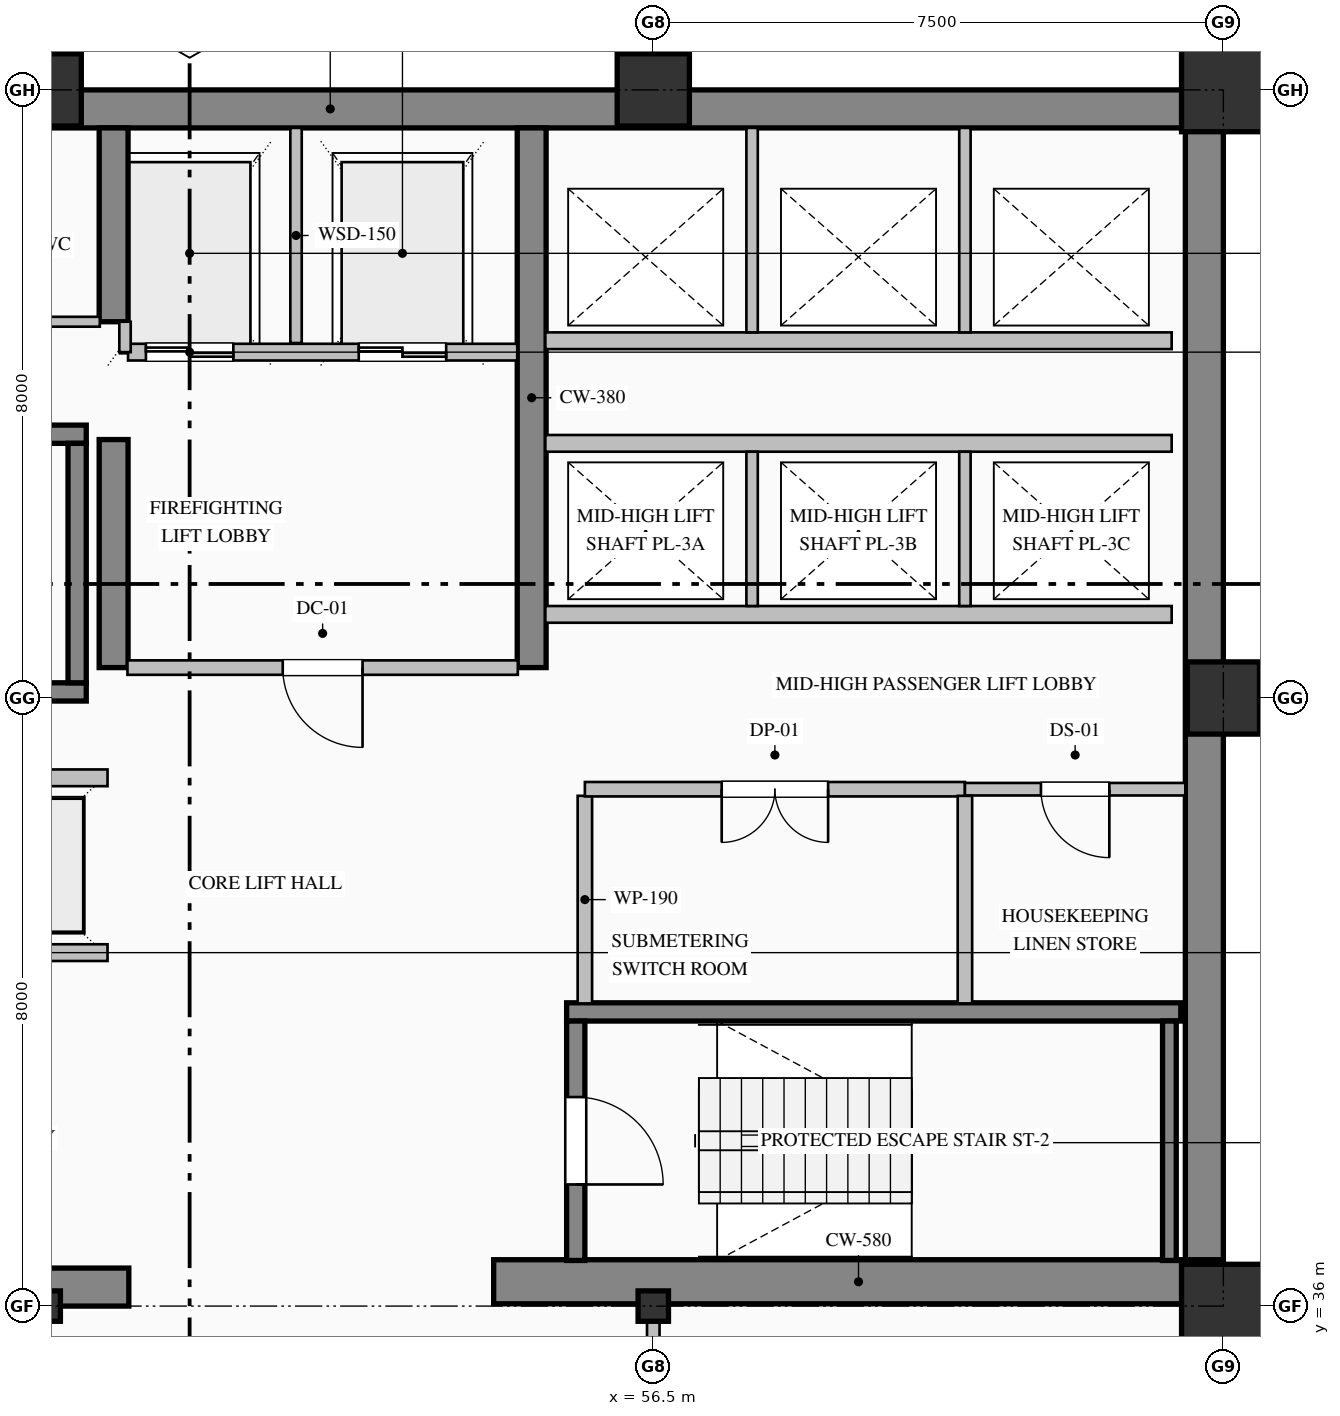
"""IFC4 building model, lengths in metres.
Left out: names, types, materials, properties, quantities, classifications, styles, units other than length and angle.
Written with IfcOpenShell. Run it as: python <this file> out.ifc"""

import sys

from ifc_helpers import new_model, si_unit, direction, frame, frame_2d, origin, origin_2d, place, context, subcontext, project, spatial, rectangle, hollow_rectangle, i_section, extrude, element, fill, save


model = new_model("IFC4")
c1 = context("Model", 3, precision=1e-05, world=origin(), true_north=direction((0.0, 1.0)))
c2 = subcontext(c1, "Body", "Model", "MODEL_VIEW")
j1 = project(units=[si_unit("LENGTHUNIT", "METRE"), si_unit("PLANEANGLEUNIT", "RADIAN")], contexts=[c1])
p1 = place(None, origin())
s1 = spatial("IfcSite", under=j1, at=p1, CompositionType="ELEMENT")
p2 = place(p1, origin())
s2 = spatial("IfcBuilding", under=s1, at=p2, CompositionType="ELEMENT")
p3 = place(p2, frame((0.0, 0.0, 147.0)))
s3 = spatial("IfcBuildingStorey", under=s2, at=p3, CompositionType="ELEMENT", Elevation=147.0)
p4 = place(p3, frame((40.5, 51.75, 0.0), z_axis=(0.0, 0.0, 1.0), x_axis=(1.0, 0.0, 0.0)))
e1 = element("IfcWall", 1, at=p4, inside=s3, PredefinedType="SHEAR", context=c2, shape_type="SweptSolid", body=[
    extrude(rectangle(XDim=23.5, YDim=0.5, at=frame_2d((11.75, 0.0))), origin(), (0.0, 0.0, 1.0), 3.765),
])
p5 = place(p3, frame((63.75, 36.32, 0.0), z_axis=(0.0, 0.0, 1.0), x_axis=(0.0, 1.0, 0.0)))
e2 = element("IfcWall", 2, at=p5, inside=s3, PredefinedType="SHEAR", context=c2, shape_type="SweptSolid", body=[
    extrude(rectangle(XDim=15.18, YDim=0.5, at=frame_2d((7.59, 0.0))), origin(), (0.0, 0.0, 1.0), 3.765),
])
p6 = place(p3, frame((40.5, 36.25, 0.0), z_axis=(0.0, 0.0, 1.0), x_axis=(1.0, 0.0, 0.0)))
e3 = element("IfcWall", 3, at=p6, inside=s3, PredefinedType="SHEAR", context=c2, shape_type="SweptSolid", body=[
    extrude(rectangle(XDim=9.1, YDim=0.5, at=frame_2d((4.55, 0.0))), origin(), (0.0, 0.0, 1.0), 3.765),
])
p7 = place(p3, frame((54.4, 36.32, 0.0), z_axis=(0.0, 0.0, 1.0), x_axis=(1.0, 0.0, 0.0)))
e4 = element("IfcWall", 4, at=p7, inside=s3, PredefinedType="SHEAR", context=c2, shape_type="SweptSolid", body=[
    extrude(rectangle(XDim=9.6, YDim=0.58, at=frame_2d((4.8, 0.0))), origin(), (0.0, 0.0, 1.0), 4.0),
])
p8 = place(p3, frame((49.4, 44.4, 0.0), z_axis=(0.0, 0.0, 1.0), x_axis=(0.0, 1.0, 0.0)))
e5 = element("IfcWall", 5, at=p8, inside=s3, PredefinedType="SHEAR", context=c2, shape_type="SweptSolid", body=[
    extrude(rectangle(XDim=3.0, YDim=0.38, at=frame_2d((1.5, 0.0))), origin(), (0.0, 0.0, 1.0), 3.765),
])
p9 = place(p3, frame((49.4, 48.95, 0.0), z_axis=(0.0, 0.0, 1.0), x_axis=(0.0, 1.0, 0.0)))
e6 = element("IfcWall", 6, at=p9, inside=s3, PredefinedType="SHEAR", context=c2, shape_type="SweptSolid", body=[
    extrude(rectangle(XDim=2.55, YDim=0.38, at=frame_2d((1.275, 0.0))), origin(), (0.0, 0.0, 1.0), 3.765),
])
p10 = place(p3, frame((54.9, 44.4, 0.0), z_axis=(0.0, 0.0, 1.0), x_axis=(0.0, 1.0, 0.0)))
e7 = element("IfcWall", 7, at=p10, inside=s3, PredefinedType="SHEAR", context=c2, shape_type="SweptSolid", body=[
    extrude(rectangle(XDim=7.1, YDim=0.38, at=frame_2d((3.55, 0.0))), origin(), (0.0, 0.0, 1.0), 3.765),
])
p11 = place(p3, frame((48.5, 36.0, 0.0), z_axis=(0.0, 0.0, 1.0), x_axis=(1.0, 0.0, 0.0)))
e8 = element("IfcColumn", 8, at=p11, inside=s3, PredefinedType="COLUMN", context=c2, shape_type="SweptSolid", body=[
    extrude(i_section(OverallWidth=0.4, OverallDepth=0.4, WebThickness=0.013, FlangeThickness=0.021, FilletRadius=0.022, at=origin_2d()), origin(), (0.0, 0.0, 1.0), 4.0),
])
p12 = place(p3, frame((48.5, 52.0, 0.0), z_axis=(0.0, 0.0, 1.0), x_axis=(1.0, 0.0, 0.0)))
e9 = element("IfcColumn", 9, at=p12, inside=s3, PredefinedType="COLUMN", context=c2, shape_type="SweptSolid", body=[
    extrude(hollow_rectangle(XDim=0.95, YDim=0.95, WallThickness=0.036, at=origin_2d()), origin(), (0.0, 0.0, 1.0), 4.0),
])
p13 = place(p3, frame((56.5, 36.0, 0.0), z_axis=(0.0, 0.0, 1.0), x_axis=(1.0, 0.0, 0.0)))
e10 = element("IfcColumn", 10, at=p13, inside=s3, PredefinedType="COLUMN", context=c2, shape_type="SweptSolid", body=[
    extrude(i_section(OverallWidth=0.4, OverallDepth=0.4, WebThickness=0.013, FlangeThickness=0.021, FilletRadius=0.022, at=origin_2d()), origin(), (0.0, 0.0, 1.0), 4.0),
])
p14 = place(p3, frame((56.5, 52.0, 0.0), z_axis=(0.0, 0.0, 1.0), x_axis=(1.0, 0.0, 0.0)))
e11 = element("IfcColumn", 11, at=p14, inside=s3, PredefinedType="COLUMN", context=c2, shape_type="SweptSolid", body=[
    extrude(hollow_rectangle(XDim=0.95, YDim=0.95, WallThickness=0.036, at=origin_2d()), origin(), (0.0, 0.0, 1.0), 4.0),
])
p15 = place(p3, frame((64.0, 36.0, 0.0), z_axis=(0.0, 0.0, 1.0), x_axis=(1.0, 0.0, 0.0)))
e12 = element("IfcColumn", 12, at=p15, inside=s3, PredefinedType="COLUMN", context=c2, shape_type="SweptSolid", body=[
    extrude(hollow_rectangle(XDim=1.1, YDim=1.1, WallThickness=0.04, at=origin_2d()), origin(), (0.0, 0.0, 1.0), 4.0),
])
p16 = place(p3, frame((64.0, 44.0, 0.0), z_axis=(0.0, 0.0, 1.0), x_axis=(1.0, 0.0, 0.0)))
e13 = element("IfcColumn", 13, at=p16, inside=s3, PredefinedType="COLUMN", context=c2, shape_type="SweptSolid", body=[
    extrude(hollow_rectangle(XDim=0.95, YDim=0.95, WallThickness=0.036, at=origin_2d()), origin(), (0.0, 0.0, 1.0), 4.0),
])
p17 = place(p3, frame((64.0, 52.0, 0.0), z_axis=(0.0, 0.0, 1.0), x_axis=(1.0, 0.0, 0.0)))
e14 = element("IfcColumn", 14, at=p17, inside=s3, PredefinedType="COLUMN", context=c2, shape_type="SweptSolid", body=[
    extrude(hollow_rectangle(XDim=1.1, YDim=1.1, WallThickness=0.04, at=origin_2d()), origin(), (0.0, 0.0, 1.0), 4.0),
])
p18 = place(p3, frame((63.83, 36.05, 0.0), z_axis=(0.0, 0.0, 1.0), x_axis=(0.0, -1.0, 0.0)))
e15 = element("IfcWall", 15, at=p18, inside=s3, PredefinedType="SOLIDWALL", context=c2, shape_type="SweptSolid", body=[
    extrude(rectangle(XDim=28.05, YDim=0.34, at=frame_2d((14.025, 0.0))), origin(), (0.0, 0.0, 1.0), 3.265),
])
p19 = place(p18, frame((3.0, 0.0, 0.7)))
e16 = element("IfcOpeningElement", 16, at=p19, cuts=e15, PredefinedType="OPENING", context=c2, shape_type="SweptSolid", body=[
    extrude(rectangle(XDim=1.2, YDim=1.85, at=frame_2d((0.6, 0.925))), frame((0.0, 0.18, 0.0), z_axis=(0.0, -1.0, 0.0), x_axis=(1.0, 0.0, 0.0)), (0.0, 0.0, 1.0), 0.36),
])
p20 = place(p18, frame((9.975, 0.0, 0.85)))
e17 = element("IfcOpeningElement", 17, at=p20, cuts=e15, PredefinedType="OPENING", context=c2, shape_type="SweptSolid", body=[
    extrude(rectangle(XDim=1.65, YDim=1.95, at=frame_2d((0.825, 0.975))), frame((0.0, 0.18, 0.0), z_axis=(0.0, -1.0, 0.0), x_axis=(1.0, 0.0, 0.0)), (0.0, 0.0, 1.0), 0.36),
])
p21 = place(p18, frame((24.6, 0.0, 0.7)))
e18 = element("IfcOpeningElement", 18, at=p21, cuts=e15, PredefinedType="OPENING", context=c2, shape_type="SweptSolid", body=[
    extrude(rectangle(XDim=1.2, YDim=1.85, at=frame_2d((0.6, 0.925))), frame((0.0, 0.18, 0.0), z_axis=(0.0, -1.0, 0.0), x_axis=(1.0, 0.0, 0.0)), (0.0, 0.0, 1.0), 0.36),
])
for number, where, z_axis, x_axis in (
    (19, (40.96, 47.47, 0.0), (0.0, 0.0, 1.0), (1.0, 0.0, 0.0)),
    (20, (49.04, 44.08, 0.0), (0.0, 0.0, 1.0), (-1.0, 0.0, 0.0)),
):
    element("IfcWall", number, at=place(p3, frame(where, z_axis=z_axis, x_axis=x_axis)), inside=s3, PredefinedType="SOLIDWALL", context=c2, shape_type="SweptSolid", body=[
        extrude(rectangle(XDim=8.08, YDim=0.24, at=frame_2d((4.04, 0.0))), origin(), (0.0, 0.0, 1.0), 4.0),
    ])
p22 = place(p3, frame((48.92, 44.2, 0.0), z_axis=(0.0, 0.0, 1.0), x_axis=(0.0, 1.0, 0.0)))
e21 = element("IfcWall", 21, at=p22, inside=s3, PredefinedType="SOLIDWALL", context=c2, shape_type="SweptSolid", body=[
    extrude(rectangle(XDim=3.15, YDim=0.24, at=frame_2d((1.575, 0.0))), origin(), (0.0, 0.0, 1.0), 4.0),
])
p23 = place(p3, frame((55.36, 39.87, 0.0), z_axis=(0.0, 0.0, 1.0), x_axis=(1.0, 0.0, 0.0)))
e22 = element("IfcWall", 22, at=p23, inside=s3, PredefinedType="SOLIDWALL", context=c2, shape_type="SweptSolid", body=[
    extrude(rectangle(XDim=8.08, YDim=0.24, at=frame_2d((4.04, 0.0))), origin(), (0.0, 0.0, 1.0), 4.0),
])
p24 = place(p3, frame((55.48, 39.75, 0.0), z_axis=(0.0, 0.0, 1.0), x_axis=(0.0, -1.0, 0.0)))
e23 = element("IfcWall", 23, at=p24, inside=s3, PredefinedType="SOLIDWALL", context=c2, shape_type="SweptSolid", body=[
    extrude(rectangle(XDim=3.15, YDim=0.24, at=frame_2d((1.575, 0.0))), origin(), (0.0, 0.0, 1.0), 4.0),
])
p25 = place(p24, frame((1.0, 0.0, 0.0)))
e24 = element("IfcOpeningElement", 24, at=p25, cuts=e23, PredefinedType="OPENING", context=c2, shape_type="SweptSolid", body=[
    extrude(rectangle(XDim=1.15, YDim=2.2, at=frame_2d((0.575, 1.1))), frame((0.0, 0.13, 0.0), z_axis=(0.0, -1.0, 0.0), x_axis=(1.0, 0.0, 0.0)), (0.0, 0.0, 1.0), 0.26),
])
p26 = place(p3, frame((63.29, 36.6, 0.0), z_axis=(0.0, 0.0, 1.0), x_axis=(0.0, 1.0, 0.0)))
e25 = element("IfcWall", 25, at=p26, inside=s3, PredefinedType="SOLIDWALL", context=c2, shape_type="SweptSolid", body=[
    extrude(rectangle(XDim=3.15, YDim=0.18, at=frame_2d((1.575, 0.0))), origin(), (0.0, 0.0, 1.0), 4.0),
])
p27 = place(p3, frame((54.71, 48.55, 0.0), z_axis=(0.0, 0.0, 1.0), x_axis=(-1.0, 0.0, 0.0)))
e26 = element("IfcWall", 26, at=p27, inside=s3, PredefinedType="PARTITIONING", context=c2, shape_type="SweptSolid", body=[
    extrude(rectangle(XDim=5.12, YDim=0.22, at=frame_2d((2.56, 0.0))), origin(), (0.0, 0.0, 1.0), 3.765),
])
p28 = place(p27, frame((3.735, 0.0, 0.0)))
e27 = element("IfcOpeningElement", 27, at=p28, cuts=e26, PredefinedType="OPENING", context=c2, shape_type="SweptSolid", body=[
    extrude(rectangle(XDim=1.15, YDim=2.2, at=frame_2d((0.575, 1.1))), frame((0.0, 0.12, 0.0), z_axis=(0.0, -1.0, 0.0), x_axis=(1.0, 0.0, 0.0)), (0.0, 0.0, 1.0), 0.24),
])
p29 = place(p27, frame((0.935, 0.0, 0.0)))
e28 = element("IfcOpeningElement", 28, at=p29, cuts=e26, PredefinedType="OPENING", context=c2, shape_type="SweptSolid", body=[
    extrude(rectangle(XDim=1.15, YDim=2.2, at=frame_2d((0.575, 1.1))), frame((0.0, 0.12, 0.0), z_axis=(0.0, -1.0, 0.0), x_axis=(1.0, 0.0, 0.0)), (0.0, 0.0, 1.0), 0.24),
])
p30 = place(p3, frame((51.8, 48.67, 0.0), z_axis=(0.0, 0.0, 1.0), x_axis=(0.0, 1.0, 0.0)))
e29 = element("IfcWall", 29, at=p30, inside=s3, PredefinedType="PARTITIONING", context=c2, shape_type="SweptSolid", body=[
    extrude(rectangle(XDim=2.83, YDim=0.15, at=frame_2d((1.415, 0.0))), origin(), (0.0, 0.0, 1.0), 3.765),
])
p31 = place(p3, frame((49.55, 48.55, 0.0), z_axis=(0.0, 0.0, 1.0), x_axis=(0.0, 1.0, 0.0)))
e30 = element("IfcWall", 30, at=p31, inside=s3, PredefinedType="PARTITIONING", context=c2, shape_type="SweptSolid", body=[
    extrude(rectangle(XDim=0.4, YDim=0.15, at=frame_2d((0.2, 0.0))), origin(), (0.0, 0.0, 1.0), 3.765),
])
p32 = place(p3, frame((49.32, 40.65, 0.0), z_axis=(0.0, 0.0, 1.0), x_axis=(-1.0, 0.0, 0.0)))
e31 = element("IfcWall", 31, at=p32, inside=s3, PredefinedType="PARTITIONING", context=c2, shape_type="SweptSolid", body=[
    extrude(rectangle(XDim=8.24, YDim=0.22, at=frame_2d((4.12, 0.0))), origin(), (0.0, 0.0, 1.0), 3.765),
])
p33 = place(p32, frame((6.37, 0.0, 0.0)))
e32 = element("IfcOpeningElement", 32, at=p33, cuts=e31, PredefinedType="OPENING", context=c2, shape_type="SweptSolid", body=[
    extrude(rectangle(XDim=1.1, YDim=2.2, at=frame_2d((0.55, 1.1))), frame((0.0, 0.12, 0.0), z_axis=(0.0, -1.0, 0.0), x_axis=(1.0, 0.0, 0.0)), (0.0, 0.0, 1.0), 0.24),
])
p34 = place(p32, frame((3.57, 0.0, 0.0)))
e33 = element("IfcOpeningElement", 33, at=p34, cuts=e31, PredefinedType="OPENING", context=c2, shape_type="SweptSolid", body=[
    extrude(rectangle(XDim=1.1, YDim=2.2, at=frame_2d((0.55, 1.1))), frame((0.0, 0.12, 0.0), z_axis=(0.0, -1.0, 0.0), x_axis=(1.0, 0.0, 0.0)), (0.0, 0.0, 1.0), 0.24),
])
p35 = place(p32, frame((0.77, 0.0, 0.0)))
e34 = element("IfcOpeningElement", 34, at=p35, cuts=e31, PredefinedType="OPENING", context=c2, shape_type="SweptSolid", body=[
    extrude(rectangle(XDim=1.1, YDim=2.2, at=frame_2d((0.55, 1.1))), frame((0.0, 0.12, 0.0), z_axis=(0.0, -1.0, 0.0), x_axis=(1.0, 0.0, 0.0)), (0.0, 0.0, 1.0), 0.24),
])
for number, where, z_axis, x_axis in (
    (35, (41.08, 42.95, 0.0), (0.0, 0.0, 1.0), (1.0, 0.0, 0.0)),
    (36, (63.32, 45.1, 0.0), (0.0, 0.0, 1.0), (-1.0, 0.0, 0.0)),
    (37, (55.08, 47.35, 0.0), (0.0, 0.0, 1.0), (1.0, 0.0, 0.0)),
):
    element("IfcWall", number, at=place(p3, frame(where, z_axis=z_axis, x_axis=x_axis)), inside=s3, PredefinedType="PARTITIONING", context=c2, shape_type="SweptSolid", body=[
        extrude(rectangle(XDim=8.24, YDim=0.22, at=frame_2d((4.12, 0.0))), origin(), (0.0, 0.0, 1.0), 3.765),
    ])
for number, where, z_axis, x_axis in (
    (38, (57.8, 45.21, 0.0), (0.0, 0.0, 1.0), (0.0, 1.0, 0.0)),
    (39, (60.6, 45.21, 0.0), (0.0, 0.0, 1.0), (0.0, 1.0, 0.0)),
):
    element("IfcWall", number, at=place(p3, frame(where, z_axis=z_axis, x_axis=x_axis)), inside=s3, PredefinedType="PARTITIONING", context=c2, shape_type="SweptSolid", body=[
        extrude(rectangle(XDim=2.03, YDim=0.15, at=frame_2d((1.015, 0.0))), origin(), (0.0, 0.0, 1.0), 3.765),
    ])
p36 = place(p3, frame((63.32, 48.7, 0.0), z_axis=(0.0, 0.0, 1.0), x_axis=(-1.0, 0.0, 0.0)))
e40 = element("IfcWall", 40, at=p36, inside=s3, PredefinedType="PARTITIONING", context=c2, shape_type="SweptSolid", body=[
    extrude(rectangle(XDim=8.24, YDim=0.22, at=frame_2d((4.12, 0.0))), origin(), (0.0, 0.0, 1.0), 3.765),
])
for number, where, z_axis, x_axis in (
    (41, (57.8, 48.81, 0.0), (0.0, 0.0, 1.0), (0.0, 1.0, 0.0)),
    (42, (60.6, 48.81, 0.0), (0.0, 0.0, 1.0), (0.0, 1.0, 0.0)),
):
    element("IfcWall", number, at=place(p3, frame(where, z_axis=z_axis, x_axis=x_axis)), inside=s3, PredefinedType="PARTITIONING", context=c2, shape_type="SweptSolid", body=[
        extrude(rectangle(XDim=2.69, YDim=0.15, at=frame_2d((1.345, 0.0))), origin(), (0.0, 0.0, 1.0), 3.765),
    ])
p37 = place(p3, frame((43.5, 48.95, 0.0), z_axis=(0.0, 0.0, 1.0), x_axis=(1.0, 0.0, 0.0)))
e43 = element("IfcWall", 43, at=p37, inside=s3, PredefinedType="PARTITIONING", context=c2, shape_type="SweptSolid", body=[
    extrude(rectangle(XDim=5.718, YDim=0.13, at=frame_2d((2.859, 0.0))), origin(), (0.0, 0.0, 1.0), 3.765),
])
p38 = place(p37, frame((2.399, 0.0, 0.0)))
e44 = element("IfcOpeningElement", 44, at=p38, cuts=e43, PredefinedType="OPENING", context=c2, shape_type="SweptSolid", body=[
    extrude(rectangle(XDim=0.92, YDim=2.15, at=frame_2d((0.46, 1.075))), frame((0.0, 0.075, 0.0), z_axis=(0.0, -1.0, 0.0), x_axis=(1.0, 0.0, 0.0)), (0.0, 0.0, 1.0), 0.15),
])
p39 = place(p3, frame((54.718, 44.4, 0.0), z_axis=(0.0, 0.0, 1.0), x_axis=(-1.0, 0.0, 0.0)))
e45 = element("IfcWall", 45, at=p39, inside=s3, PredefinedType="PARTITIONING", context=c2, shape_type="SweptSolid", body=[
    extrude(rectangle(XDim=5.136, YDim=0.19, at=frame_2d((2.568, 0.0))), origin(), (0.0, 0.0, 1.0), 3.765),
])
p40 = place(p39, frame((2.043, 0.0, 0.0)))
e46 = element("IfcOpeningElement", 46, at=p40, cuts=e45, PredefinedType="OPENING", context=c2, shape_type="SweptSolid", body=[
    extrude(rectangle(XDim=1.05, YDim=2.15, at=frame_2d((0.525, 1.075))), frame((0.0, 0.105, 0.0), z_axis=(0.0, -1.0, 0.0), x_axis=(1.0, 0.0, 0.0)), (0.0, 0.0, 1.0), 0.21),
])
p41 = place(p3, frame((55.6, 42.713, 0.0), z_axis=(0.0, 0.0, 1.0), x_axis=(0.0, -1.0, 0.0)))
e47 = element("IfcWall", 47, at=p41, inside=s3, PredefinedType="PARTITIONING", context=c2, shape_type="SweptSolid", body=[
    extrude(rectangle(XDim=2.731, YDim=0.19, at=frame_2d((1.365, 0.0))), origin(), (0.0, 0.0, 1.0), 3.765),
])
p42 = place(p3, frame((60.6, 42.8, 0.0), z_axis=(0.0, 0.0, 1.0), x_axis=(-1.0, 0.0, 0.0)))
e48 = element("IfcWall", 48, at=p42, inside=s3, PredefinedType="PARTITIONING", context=c2, shape_type="SweptSolid", body=[
    extrude(rectangle(XDim=5.0, YDim=0.19, at=frame_2d((2.5, 0.0))), origin(), (0.0, 0.0, 1.0), 3.765),
])
p43 = place(p42, frame((1.8, 0.0, 0.0)))
e49 = element("IfcOpeningElement", 49, at=p43, cuts=e48, PredefinedType="OPENING", context=c2, shape_type="SweptSolid", body=[
    extrude(rectangle(XDim=1.4, YDim=2.25, at=frame_2d((0.7, 1.125))), frame((0.0, 0.105, 0.0), z_axis=(0.0, -1.0, 0.0), x_axis=(1.0, 0.0, 0.0)), (0.0, 0.0, 1.0), 0.21),
])
p44 = place(p3, frame((63.5, 42.8, 0.0), z_axis=(0.0, 0.0, 1.0), x_axis=(-1.0, 0.0, 0.0)))
e50 = element("IfcWall", 50, at=p44, inside=s3, PredefinedType="PARTITIONING", context=c2, shape_type="SweptSolid", body=[
    extrude(rectangle(XDim=2.9, YDim=0.165, at=frame_2d((1.45, 0.0))), origin(), (0.0, 0.0, 1.0), 3.765),
])
p45 = place(p44, frame((1.0, 0.0, 0.0)))
e51 = element("IfcOpeningElement", 51, at=p45, cuts=e50, PredefinedType="OPENING", context=c2, shape_type="SweptSolid", body=[
    extrude(rectangle(XDim=0.9, YDim=2.15, at=frame_2d((0.45, 1.075))), frame((0.0, 0.093, 0.0), z_axis=(0.0, -1.0, 0.0), x_axis=(1.0, 0.0, 0.0)), (0.0, 0.0, 1.0), 0.185),
])
p46 = place(p3, frame((60.6, 42.713, 0.0), z_axis=(0.0, 0.0, 1.0), x_axis=(0.0, -1.0, 0.0)))
e52 = element("IfcWall", 52, at=p46, inside=s3, PredefinedType="PARTITIONING", context=c2, shape_type="SweptSolid", body=[
    extrude(rectangle(XDim=2.731, YDim=0.19, at=frame_2d((1.365, 0.0))), origin(), (0.0, 0.0, 1.0), 3.765),
])
p47 = place(p3, frame((56.5, 36.0, 0.0), z_axis=(0.0, 0.0, 1.0), x_axis=(0.0, -1.0, 0.0)))
e53 = element("IfcWall", 53, at=p47, inside=s3, PredefinedType="PARTITIONING", context=c2, shape_type="SweptSolid", body=[
    extrude(rectangle(XDim=2.325, YDim=0.165, at=frame_2d((1.163, 0.0))), origin(), (0.0, 0.0, 1.0), 3.157),
])
p48 = place(p25, origin())
e54 = element("IfcDoor", 54, at=p48, inside=s3, OperationType="SINGLE_SWING_RIGHT", PredefinedType="DOOR", context=c2, shape_type="SweptSolid", body=[
    extrude(rectangle(XDim=1.15, YDim=2.2, at=frame_2d((0.575, 1.1))), frame((0.0, 0.025, 0.0), z_axis=(0.0, -1.0, 0.0), x_axis=(1.0, 0.0, 0.0)), (0.0, 0.0, 1.0), 0.05),
])
fill(e24, e54)
p49 = place(p28, origin())
e55 = element("IfcDoor", 55, at=p49, inside=s3, OperationType="DOUBLE_DOOR_SLIDING", PredefinedType="DOOR", context=c2, shape_type="SweptSolid", body=[
    extrude(rectangle(XDim=1.15, YDim=2.2, at=frame_2d((0.575, 1.1))), frame((0.0, 0.025, 0.0), z_axis=(0.0, -1.0, 0.0), x_axis=(1.0, 0.0, 0.0)), (0.0, 0.0, 1.0), 0.05),
])
fill(e27, e55)
p50 = place(p29, origin())
e56 = element("IfcDoor", 56, at=p50, inside=s3, OperationType="DOUBLE_DOOR_SLIDING", PredefinedType="DOOR", context=c2, shape_type="SweptSolid", body=[
    extrude(rectangle(XDim=1.15, YDim=2.2, at=frame_2d((0.575, 1.1))), frame((0.0, 0.025, 0.0), z_axis=(0.0, -1.0, 0.0), x_axis=(1.0, 0.0, 0.0)), (0.0, 0.0, 1.0), 0.05),
])
fill(e28, e56)
p51 = place(p40, origin())
e57 = element("IfcDoor", 57, at=p51, inside=s3, OperationType="SINGLE_SWING_LEFT", PredefinedType="DOOR", context=c2, shape_type="SweptSolid", body=[
    extrude(rectangle(XDim=1.05, YDim=2.15, at=frame_2d((0.525, 1.075))), frame((0.0, 0.025, 0.0), z_axis=(0.0, -1.0, 0.0), x_axis=(1.0, 0.0, 0.0)), (0.0, 0.0, 1.0), 0.05),
])
fill(e46, e57)
p52 = place(p43, origin())
e58 = element("IfcDoor", 58, at=p52, inside=s3, OperationType="DOUBLE_DOOR_SINGLE_SWING", PredefinedType="DOOR", context=c2, shape_type="SweptSolid", body=[
    extrude(rectangle(XDim=1.4, YDim=2.25, at=frame_2d((0.7, 1.125))), frame((0.0, 0.025, 0.0), z_axis=(0.0, -1.0, 0.0), x_axis=(1.0, 0.0, 0.0)), (0.0, 0.0, 1.0), 0.05),
])
fill(e49, e58)
p53 = place(p45, origin())
e59 = element("IfcDoor", 59, at=p53, inside=s3, OperationType="SINGLE_SWING_LEFT", PredefinedType="DOOR", context=c2, shape_type="SweptSolid", body=[
    extrude(rectangle(XDim=0.9, YDim=2.15, at=frame_2d((0.45, 1.075))), frame((0.0, 0.025, 0.0), z_axis=(0.0, -1.0, 0.0), x_axis=(1.0, 0.0, 0.0)), (0.0, 0.0, 1.0), 0.05),
])
fill(e51, e59)
save(model, sys.argv[1])
